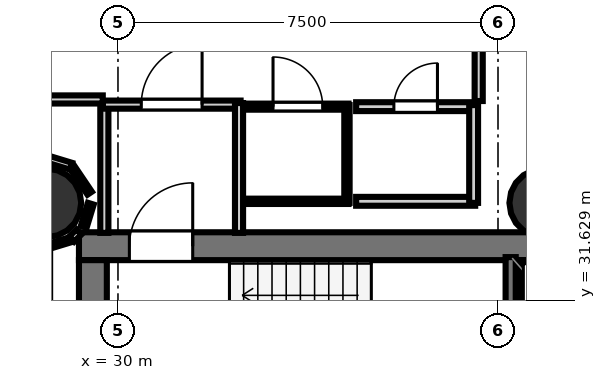
"""IFC4 building model, lengths in metres.
Left out: names, types, materials, properties, quantities, classifications, styles, units other than length and angle.
Written with IfcOpenShell. Run it as: python <this file> out.ifc"""

import sys

from ifc_helpers import new_model, si_unit, direction, frame, frame_2d, origin, origin_2d, place, context, subcontext, project, spatial, rectangle, hollow_circle, extrude, element, fill, save


model = new_model("IFC4")
c1 = context("Model", 3, precision=1e-05, world=origin(), true_north=direction((0.0, 1.0)))
c2 = subcontext(c1, "Body", "Model", "MODEL_VIEW")
j1 = project(units=[si_unit("LENGTHUNIT", "METRE"), si_unit("PLANEANGLEUNIT", "RADIAN")], contexts=[c1])
p1 = place(None, origin())
s1 = spatial("IfcSite", under=j1, at=p1, CompositionType="ELEMENT")
p2 = place(p1, origin())
s2 = spatial("IfcBuilding", under=s1, at=p2, CompositionType="ELEMENT")
p3 = place(p2, frame((0.0, 0.0, 151.3)))
s3 = spatial("IfcBuildingStorey", under=s2, at=p3, CompositionType="ELEMENT", Elevation=151.3)
p4 = place(p3, frame((29.23, 32.695, 0.0), z_axis=(0.0, 0.0, 1.0), x_axis=(1.0, 0.0, 0.0)))
e1 = element("IfcWall", 1, at=p4, inside=s3, PredefinedType="SHEAR", context=c2, shape_type="SweptSolid", body=[
    extrude(rectangle(XDim=10.62, YDim=0.55, at=frame_2d((5.31, 0.0))), origin(), (0.0, 0.0, 1.0), 3.52),
])
p5 = place(p4, frame((0.995, 0.0, 0.0)))
e2 = element("IfcOpeningElement", 2, at=p5, cuts=e1, PredefinedType="OPENING", context=c2, shape_type="SweptSolid", body=[
    extrude(rectangle(XDim=1.25, YDim=2.15, at=frame_2d((0.625, 1.075))), frame((0.0, 0.285, 0.0), z_axis=(0.0, -1.0, 0.0), x_axis=(1.0, 0.0, 0.0)), (0.0, 0.0, 1.0), 0.57),
])
p6 = place(p3, frame((29.505, 24.98, 0.0), z_axis=(0.0, 0.0, 1.0), x_axis=(0.0, 1.0, 0.0)))
e3 = element("IfcWall", 3, at=p6, inside=s3, PredefinedType="SHEAR", context=c2, shape_type="SweptSolid", body=[
    extrude(rectangle(XDim=7.44, YDim=0.55, at=frame_2d((3.72, 0.0))), origin(), (0.0, 0.0, 1.0), 3.52),
])
p7 = place(p3, frame((38.18, 24.98, 0.0), z_axis=(0.0, 0.0, 1.0), x_axis=(0.0, 1.0, 0.0)))
e4 = element("IfcWall", 4, at=p7, inside=s3, PredefinedType="SHEAR", context=c2, shape_type="SweptSolid", body=[
    extrude(rectangle(XDim=7.44, YDim=0.5, at=frame_2d((3.72, 0.0))), origin(), (0.0, 0.0, 1.0), 3.52),
])
for number, where, z_axis, x_axis in (
    (5, (28.6, 33.55, 0.0), (0.0, 0.0, 1.0), (1.0, 0.0, 0.0)),
    (6, (38.4, 33.55, 0.0), (0.0, 0.0, 1.0), (1.0, 0.0, 0.0)),
):
    element("IfcColumn", number, at=place(p3, frame(where, z_axis=z_axis, x_axis=x_axis)), inside=s3, PredefinedType="COLUMN", context=c2, shape_type="SweptSolid", body=[
        extrude(hollow_circle(Radius=0.675, WallThickness=0.032, at=origin_2d()), origin(), (0.0, 0.0, 1.0), 3.7),
    ])
p8 = place(p3, frame((37.75, 30.12, 0.0), z_axis=(0.0, 0.0, 1.0), x_axis=(0.0, 1.0, 0.0)))
e7 = element("IfcWall", 7, at=p8, inside=s3, PredefinedType="SOLIDWALL", context=c2, shape_type="SweptSolid", body=[
    extrude(rectangle(XDim=2.36, YDim=0.2, at=frame_2d((1.18, 0.0))), origin(), (0.0, 0.0, 1.0), 3.52),
])
p9 = place(p3, frame((29.731, 32.958, 0.0), z_axis=(0.0, 0.0, 1.0), x_axis=(0.0, 1.0, 0.0)))
e8 = element("IfcWall", 8, at=p9, inside=s3, PredefinedType="PARTITIONING", context=c2, shape_type="SweptSolid", body=[
    extrude(rectangle(XDim=2.562, YDim=0.16, at=frame_2d((1.281, 0.0))), origin(), (0.0, 0.0, 1.0), 2.84),
])
p10 = place(p3, frame((29.7, 35.489, 0.0), z_axis=(0.0, 0.0, 1.0), x_axis=(1.0, 0.0, 0.0)))
e9 = element("IfcWall", 9, at=p10, inside=s3, PredefinedType="PARTITIONING", context=c2, shape_type="SweptSolid", body=[
    extrude(rectangle(XDim=2.72, YDim=0.16, at=frame_2d((1.36, 0.0))), origin(), (0.0, 0.0, 1.0), 2.84),
])
p11 = place(p10, frame((0.76, 0.0, 0.0)))
e10 = element("IfcOpeningElement", 10, at=p11, cuts=e9, PredefinedType="OPENING", context=c2, shape_type="SweptSolid", body=[
    extrude(rectangle(XDim=1.2, YDim=2.15, at=frame_2d((0.6, 1.075))), frame((0.0, 0.09, 0.0), z_axis=(0.0, -1.0, 0.0), x_axis=(1.0, 0.0, 0.0)), (0.0, 0.0, 1.0), 0.18),
])
p12 = place(p3, frame((32.389, 35.52, 0.0), z_axis=(0.0, 0.0, 1.0), x_axis=(0.0, -1.0, 0.0)))
e11 = element("IfcWall", 11, at=p12, inside=s3, PredefinedType="PARTITIONING", context=c2, shape_type="SweptSolid", body=[
    extrude(rectangle(XDim=2.562, YDim=0.16, at=frame_2d((1.281, 0.0))), origin(), (0.0, 0.0, 1.0), 2.84),
])
p13 = place(p3, frame((34.55, 33.581, 0.0), z_axis=(0.0, 0.0, 1.0), x_axis=(-1.0, 0.0, 0.0)))
e12 = element("IfcWall", 12, at=p13, inside=s3, PredefinedType="PARTITIONING", context=c2, shape_type="SweptSolid", body=[
    extrude(rectangle(XDim=2.0, YDim=0.105, at=frame_2d((1.0, 0.0))), origin(), (0.0, 0.0, 1.0), 2.84),
])
p14 = place(p3, frame((32.55, 35.449, 0.0), z_axis=(0.0, 0.0, 1.0), x_axis=(1.0, 0.0, 0.0)))
e13 = element("IfcWall", 13, at=p14, inside=s3, PredefinedType="PARTITIONING", context=c2, shape_type="SweptSolid", body=[
    extrude(rectangle(XDim=2.0, YDim=0.12, at=frame_2d((1.0, 0.0))), origin(), (0.0, 0.0, 1.0), 2.84),
])
p15 = place(p14, frame((0.51, 0.0, 0.0)))
e14 = element("IfcOpeningElement", 14, at=p15, cuts=e13, PredefinedType="OPENING", context=c2, shape_type="SweptSolid", body=[
    extrude(rectangle(XDim=0.98, YDim=2.1, at=frame_2d((0.49, 1.05))), frame((0.0, 0.07, 0.0), z_axis=(0.0, -1.0, 0.0), x_axis=(1.0, 0.0, 0.0)), (0.0, 0.0, 1.0), 0.14),
])
p16 = place(p3, frame((34.519, 35.48, 0.0), z_axis=(0.0, 0.0, 1.0), x_axis=(0.0, -1.0, 0.0)))
e15 = element("IfcWall", 15, at=p16, inside=s3, PredefinedType="PARTITIONING", context=c2, shape_type="SweptSolid", body=[
    extrude(rectangle(XDim=1.93, YDim=0.105, at=frame_2d((0.965, 0.0))), origin(), (0.0, 0.0, 1.0), 2.84),
])
p17 = place(p3, frame((37.05, 33.581, 0.0), z_axis=(0.0, 0.0, 1.0), x_axis=(-1.0, 0.0, 0.0)))
e16 = element("IfcWall", 16, at=p17, inside=s3, PredefinedType="PLUMBINGWALL", context=c2, shape_type="SweptSolid", body=[
    extrude(rectangle(XDim=2.35, YDim=0.175, at=frame_2d((1.175, 0.0))), origin(), (0.0, 0.0, 1.0), 2.84),
])
p18 = place(p3, frame((34.7, 35.449, 0.0), z_axis=(0.0, 0.0, 1.0), x_axis=(1.0, 0.0, 0.0)))
e17 = element("IfcWall", 17, at=p18, inside=s3, PredefinedType="PLUMBINGWALL", context=c2, shape_type="SweptSolid", body=[
    extrude(rectangle(XDim=2.35, YDim=0.175, at=frame_2d((1.175, 0.0))), origin(), (0.0, 0.0, 1.0), 2.84),
])
p19 = place(p18, frame((0.745, 0.0, 0.0)))
e18 = element("IfcOpeningElement", 18, at=p19, cuts=e17, PredefinedType="OPENING", context=c2, shape_type="SweptSolid", body=[
    extrude(rectangle(XDim=0.86, YDim=2.05, at=frame_2d((0.43, 1.025))), frame((0.0, 0.097, 0.0), z_axis=(0.0, -1.0, 0.0), x_axis=(1.0, 0.0, 0.0)), (0.0, 0.0, 1.0), 0.195),
])
p20 = place(p3, frame((37.019, 35.48, 0.0), z_axis=(0.0, 0.0, 1.0), x_axis=(0.0, -1.0, 0.0)))
e19 = element("IfcWall", 19, at=p20, inside=s3, PredefinedType="PLUMBINGWALL", context=c2, shape_type="SweptSolid", body=[
    extrude(rectangle(XDim=1.93, YDim=0.175, at=frame_2d((0.965, 0.0))), origin(), (0.0, 0.0, 1.0), 2.84),
])
p21 = place(p3, frame((37.119, 39.615, 0.0), z_axis=(0.0, 0.0, 1.0), x_axis=(0.0, -1.0, 0.0)))
e20 = element("IfcWall", 20, at=p21, inside=s3, PredefinedType="PARTITIONING", context=c2, shape_type="SweptSolid", body=[
    extrude(rectangle(XDim=4.055, YDim=0.16, at=frame_2d((2.027, 0.0))), origin(), (0.0, 0.0, 1.0), 2.84),
])
p22 = place(p3, frame((29.7, 35.591, 0.0), z_axis=(0.0, 0.0, 1.0), x_axis=(-1.0, 0.0, 0.0)))
e21 = element("IfcWall", 21, at=p22, inside=s3, PredefinedType="PARTITIONING", context=c2, shape_type="SweptSolid", body=[
    extrude(rectangle(XDim=3.12, YDim=0.16, at=frame_2d((1.56, 0.0))), origin(), (0.0, 0.0, 1.0), 2.84),
])
p23 = place(p3, frame((29.441, 33.741, 0.0), z_axis=(0.0, 0.0, 1.0), x_axis=(-0.559619584068, 0.828749613048, 0.0)))
e22 = element("IfcWall", 22, at=p23, inside=s3, PredefinedType="PARTITIONING", context=c2, shape_type="SweptSolid", body=[
    extrude(rectangle(XDim=0.629, YDim=0.105, at=frame_2d((0.314, 0.0))), origin(), (0.0, 0.0, 1.0), 2.84),
])
p24 = place(p3, frame((29.073, 34.274, 0.0), z_axis=(0.0, 0.0, 1.0), x_axis=(-0.956893067978, 0.290440452511, 0.0)))
e23 = element("IfcWall", 23, at=p24, inside=s3, PredefinedType="PARTITIONING", context=c2, shape_type="SweptSolid", body=[
    extrude(rectangle(XDim=0.485, YDim=0.14, at=frame_2d((0.243, 0.0))), origin(), (0.0, 0.0, 1.0), 2.84),
])
p25 = place(p3, frame((28.609, 32.685, 0.0), z_axis=(0.0, 0.0, 1.0), x_axis=(0.956893067978, 0.290440452511, 0.0)))
e24 = element("IfcWall", 24, at=p25, inside=s3, PredefinedType="PARTITIONING", context=c2, shape_type="SweptSolid", body=[
    extrude(rectangle(XDim=0.485, YDim=0.105, at=frame_2d((0.243, 0.0))), origin(), (0.0, 0.0, 1.0), 2.84),
])
p26 = place(p3, frame((29.086, 32.834, 0.0), z_axis=(0.0, 0.0, 1.0), x_axis=(0.707106781187, 0.707106781187, 0.0)))
e25 = element("IfcWall", 25, at=p26, inside=s3, PredefinedType="PARTITIONING", context=c2, shape_type="SweptSolid", body=[
    extrude(rectangle(XDim=0.204, YDim=0.14, at=frame_2d((0.102, 0.0))), origin(), (0.0, 0.0, 1.0), 2.84),
])
p27 = place(p3, frame((29.324, 33.077, 0.0), z_axis=(0.0, 0.0, 1.0), x_axis=(0.292866596221, 0.956153312402, 0.0)))
e26 = element("IfcWall", 26, at=p27, inside=s3, PredefinedType="PARTITIONING", context=c2, shape_type="SweptSolid", body=[
    extrude(rectangle(XDim=0.479, YDim=0.12, at=frame_2d((0.239, 0.0))), origin(), (0.0, 0.0, 1.0), 2.84),
])
p28 = place(p5, origin())
e27 = element("IfcDoor", 27, at=p28, inside=s3, OperationType="SINGLE_SWING_RIGHT", PredefinedType="DOOR", context=c2, shape_type="SweptSolid", body=[
    extrude(rectangle(XDim=1.25, YDim=2.15, at=frame_2d((0.625, 1.075))), frame((0.0, 0.025, 0.0), z_axis=(0.0, -1.0, 0.0), x_axis=(1.0, 0.0, 0.0)), (0.0, 0.0, 1.0), 0.05),
])
fill(e2, e27)
p29 = place(p11, origin())
e28 = element("IfcDoor", 28, at=p29, inside=s3, OperationType="SINGLE_SWING_RIGHT", PredefinedType="DOOR", context=c2, shape_type="SweptSolid", body=[
    extrude(rectangle(XDim=1.2, YDim=2.15, at=frame_2d((0.6, 1.075))), frame((0.0, 0.025, 0.0), z_axis=(0.0, -1.0, 0.0), x_axis=(1.0, 0.0, 0.0)), (0.0, 0.0, 1.0), 0.05),
])
fill(e10, e28)
p30 = place(p15, origin())
e29 = element("IfcDoor", 29, at=p30, inside=s3, OperationType="SINGLE_SWING_LEFT", PredefinedType="DOOR", context=c2, shape_type="SweptSolid", body=[
    extrude(rectangle(XDim=0.98, YDim=2.1, at=frame_2d((0.49, 1.05))), frame((0.0, 0.025, 0.0), z_axis=(0.0, -1.0, 0.0), x_axis=(1.0, 0.0, 0.0)), (0.0, 0.0, 1.0), 0.05),
])
fill(e14, e29)
p31 = place(p19, origin())
e30 = element("IfcDoor", 30, at=p31, inside=s3, OperationType="SINGLE_SWING_RIGHT", PredefinedType="DOOR", context=c2, shape_type="SweptSolid", body=[
    extrude(rectangle(XDim=0.86, YDim=2.05, at=frame_2d((0.43, 1.025))), frame((0.0, 0.025, 0.0), z_axis=(0.0, -1.0, 0.0), x_axis=(1.0, 0.0, 0.0)), (0.0, 0.0, 1.0), 0.05),
])
fill(e18, e30)
save(model, sys.argv[1])
